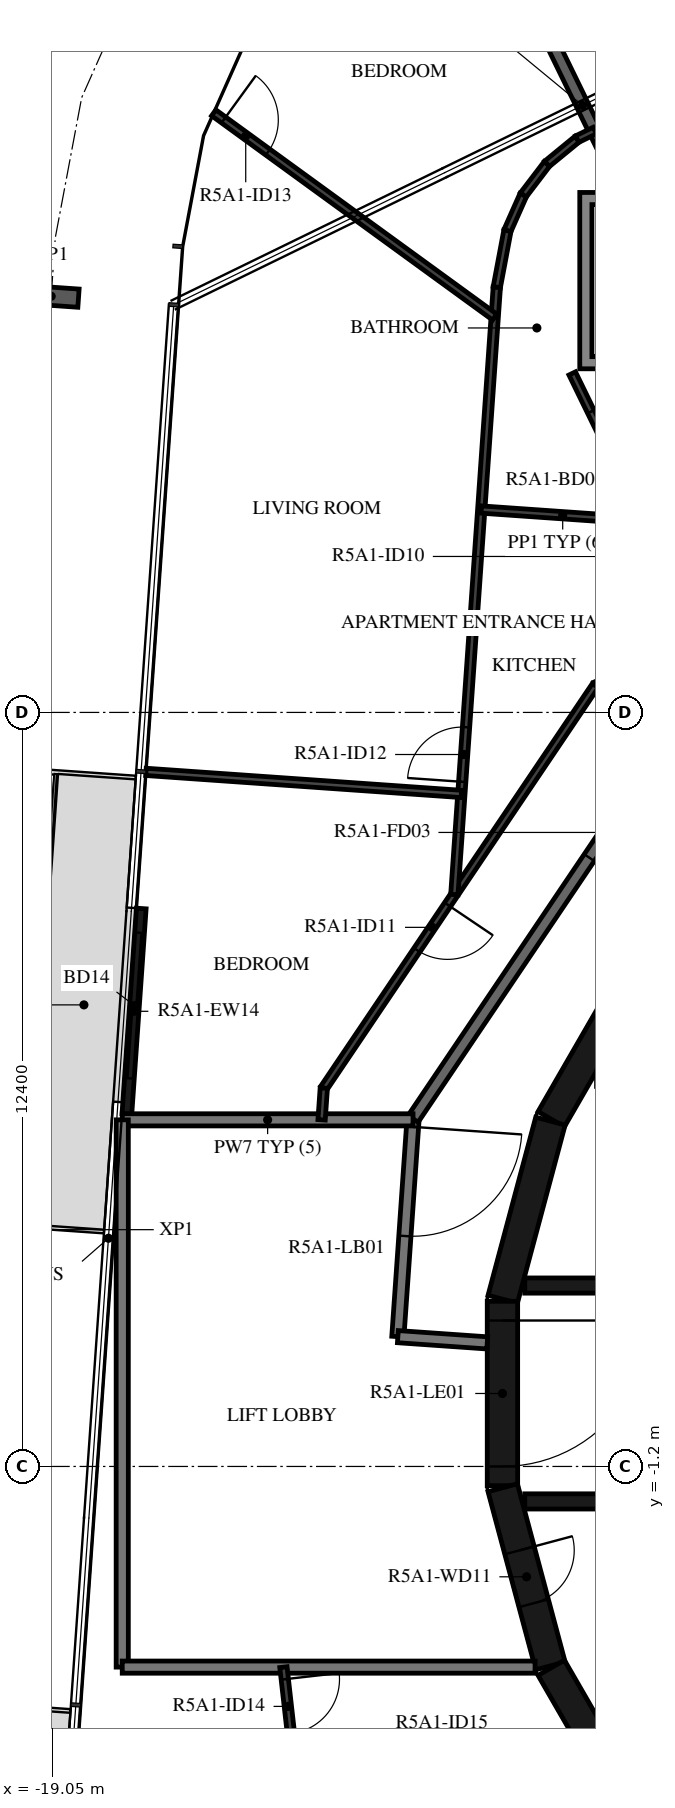
"""IFC4 building model, lengths in metres.
Left out: names, types, materials, properties, quantities, classifications, styles, units other than length and angle.
Written with IfcOpenShell. Run it as: python <this file> out.ifc"""

import sys

from ifc_helpers import new_model, si_unit, direction, frame, frame_2d, origin, origin_2d, place, context, subcontext, project, spatial, polyline, rectangle, i_section, outline, extrude, element, fill, save


model = new_model("IFC4")
c1 = context("Model", 3, precision=1e-05, world=origin(), true_north=direction((0.0, 1.0)))
c2 = subcontext(c1, "Body", "Model", "MODEL_VIEW")
j1 = project(units=[si_unit("LENGTHUNIT", "METRE"), si_unit("PLANEANGLEUNIT", "RADIAN")], contexts=[c1])
p1 = place(None, origin())
s1 = spatial("IfcSite", under=j1, at=p1, CompositionType="ELEMENT")
p2 = place(p1, origin())
s2 = spatial("IfcBuilding", under=s1, at=p2, CompositionType="ELEMENT")
p3 = place(p2, frame((0.0, 0.0, 191.9)))
s3 = spatial("IfcBuildingStorey", under=s2, at=p3, CompositionType="ELEMENT", Elevation=191.9)
p4 = place(p3, frame((-19.069, 18.044, -0.38), z_axis=(0.0, 0.0, 1.0), x_axis=(0.069756005795, 0.997564082982, 0.0)))
e1 = element("IfcColumn", 1, at=p4, inside=s3, PredefinedType="COLUMN", context=c2, shape_type="SweptSolid", body=[
    extrude(i_section(OverallWidth=0.3, OverallDepth=0.9, WebThickness=0.019, FlangeThickness=0.035, FilletRadius=0.03, at=origin_2d()), origin(), (0.0, 0.0, 1.0), 3.5),
])
p5 = place(p3, frame((-17.587, 7.975, 0.0), z_axis=(0.0, 0.0, 1.0), x_axis=(-0.069813354682, -0.997560071128, 0.0)))
e2 = element("IfcWall", 2, at=p5, inside=s3, PredefinedType="STANDARD", context=c2, shape_type="SweptSolid", body=[
    extrude(rectangle(XDim=3.389, YDim=0.16, at=frame_2d((1.694, 0.0))), origin(), (0.0, 0.0, 1.0), 3.12),
])
p6 = place(p5, frame((0.4, 0.0, 0.0)))
e3 = element("IfcOpeningElement", 3, at=p6, cuts=e2, PredefinedType="OPENING", context=c2, shape_type="SweptSolid", body=[
    extrude(rectangle(XDim=2.4, YDim=2.4, at=frame_2d((1.2, 1.2))), frame((0.0, 0.09, 0.0), z_axis=(0.0, -1.0, 0.0), x_axis=(1.0, 0.0, 0.0)), (0.0, 0.0, 1.0), 0.18),
])
for number, where, z_axis, x_axis in (
    (4, (-9.329, 7.137, 0.0), (0.0, 0.0, 1.0), (-0.5, -0.866, 0.0)),
    (5, (-10.858, 4.479, 0.0), (0.0, 0.0, 1.0), (-0.259, -0.966, 0.0)),
):
    element("IfcWall", number, at=place(p3, frame(where, z_axis=z_axis, x_axis=x_axis)), inside=s3, PredefinedType="SHEAR", context=c2, shape_type="SweptSolid", body=[
        extrude(rectangle(XDim=3.033, YDim=0.5, at=frame_2d((1.516, 0.0))), origin(), (0.0, 0.0, 1.0), 3.12),
    ])
p7 = place(p3, frame((-11.647, 1.516, 0.0), z_axis=(0.0, 0.0, 1.0), x_axis=(0.0, -1.0, 0.0)))
e6 = element("IfcWall", 6, at=p7, inside=s3, PredefinedType="SHEAR", context=c2, shape_type="SweptSolid", body=[
    extrude(rectangle(XDim=3.033, YDim=0.5, at=frame_2d((1.516, 0.0))), origin(), (0.0, 0.0, 1.0), 3.12),
])
p8 = place(p7, frame((0.316, 0.0, 0.0)))
e7 = element("IfcOpeningElement", 7, at=p8, cuts=e6, PredefinedType="OPENING", context=c2, shape_type="SweptSolid", body=[
    extrude(rectangle(XDim=2.4, YDim=2.1, at=frame_2d((1.2, 1.05))), frame((0.0, 0.26, 0.0), z_axis=(0.0, -1.0, 0.0), x_axis=(1.0, 0.0, 0.0)), (0.0, 0.0, 1.0), 0.52),
])
p9 = place(p3, frame((-11.643, -1.55, 0.0), z_axis=(0.0, 0.0, 1.0), x_axis=(0.258734743916, -0.965948410781, 0.0)))
e8 = element("IfcWall", 8, at=p9, inside=s3, PredefinedType="SHEAR", context=c2, shape_type="SweptSolid", body=[
    extrude(rectangle(XDim=3.033, YDim=0.5, at=frame_2d((1.516, 0.0))), origin(), (0.0, 0.0, 1.0), 3.12),
])
p10 = place(p9, frame((1.066, 0.0, 0.0)))
e9 = element("IfcOpeningElement", 9, at=p10, cuts=e8, PredefinedType="OPENING", context=c2, shape_type="SweptSolid", body=[
    extrude(rectangle(XDim=0.9, YDim=2.1, at=frame_2d((0.45, 1.05))), frame((0.0, 0.26, 0.0), z_axis=(0.0, -1.0, 0.0), x_axis=(1.0, 0.0, 0.0)), (0.0, 0.0, 1.0), 0.52),
])
p11 = place(p3, frame((-10.845, -4.51, 0.0), z_axis=(0.0, 0.0, 1.0), x_axis=(0.500087131594, -0.865975092491, 0.0)))
e10 = element("IfcWall", 10, at=p11, inside=s3, PredefinedType="SHEAR", context=c2, shape_type="SweptSolid", body=[
    extrude(rectangle(XDim=3.033, YDim=0.5, at=frame_2d((1.516, 0.0))), origin(), (0.0, 0.0, 1.0), 3.12),
])
p12 = place(p3, frame((-11.28, 1.775, 0.0), z_axis=(0.0, 0.0, 1.0), x_axis=(1.0, 0.0, 0.0)))
e11 = element("IfcWall", 11, at=p12, inside=s3, PredefinedType="SHEAR", context=c2, shape_type="SweptSolid", body=[
    extrude(rectangle(XDim=14.38, YDim=0.25, at=frame_2d((7.19, 0.0))), origin(), (0.0, 0.0, 1.0), 3.12),
])
p13 = place(p12, frame((10.73, 0.0, 0.0)))
e12 = element("IfcOpeningElement", 12, at=p13, cuts=e11, PredefinedType="OPENING", context=c2, shape_type="SweptSolid", body=[
    extrude(rectangle(XDim=1.1, YDim=2.1, at=frame_2d((0.55, 1.05))), frame((0.0, 0.135, 0.0), z_axis=(0.0, -1.0, 0.0), x_axis=(1.0, 0.0, 0.0)), (0.0, 0.0, 1.0), 0.27),
])
p14 = place(p12, frame((12.88, 0.0, 0.0)))
e13 = element("IfcOpeningElement", 13, at=p14, cuts=e11, PredefinedType="OPENING", context=c2, shape_type="SweptSolid", body=[
    extrude(rectangle(XDim=1.1, YDim=2.1, at=frame_2d((0.55, 1.05))), frame((0.0, 0.135, 0.0), z_axis=(0.0, -1.0, 0.0), x_axis=(1.0, 0.0, 0.0)), (0.0, 0.0, 1.0), 0.27),
])
p15 = place(p12, frame((3.305, 0.0, 0.0)))
e14 = element("IfcOpeningElement", 14, at=p15, cuts=e11, PredefinedType="OPENING", context=c2, shape_type="SweptSolid", body=[
    extrude(rectangle(XDim=0.9, YDim=2.1, at=frame_2d((0.45, 1.05))), frame((0.0, 0.135, 0.0), z_axis=(0.0, -1.0, 0.0), x_axis=(1.0, 0.0, 0.0)), (0.0, 0.0, 1.0), 0.27),
])
p16 = place(p12, frame((7.605, 0.0, 0.0)))
e15 = element("IfcOpeningElement", 15, at=p16, cuts=e11, PredefinedType="OPENING", context=c2, shape_type="SweptSolid", body=[
    extrude(rectangle(XDim=0.9, YDim=2.1, at=frame_2d((0.45, 1.05))), frame((0.0, 0.135, 0.0), z_axis=(0.0, -1.0, 0.0), x_axis=(1.0, 0.0, 0.0)), (0.0, 0.0, 1.0), 0.27),
])
p17 = place(p3, frame((-11.28, -1.775, 0.0), z_axis=(0.0, 0.0, 1.0), x_axis=(1.0, 0.0, 0.0)))
e16 = element("IfcWall", 16, at=p17, inside=s3, PredefinedType="SHEAR", context=c2, shape_type="SweptSolid", body=[
    extrude(rectangle(XDim=14.38, YDim=0.25, at=frame_2d((7.19, 0.0))), origin(), (0.0, 0.0, 1.0), 3.12),
])
p18 = place(p17, frame((12.88, 0.0, 0.0)))
e17 = element("IfcOpeningElement", 17, at=p18, cuts=e16, PredefinedType="OPENING", context=c2, shape_type="SweptSolid", body=[
    extrude(rectangle(XDim=1.1, YDim=2.1, at=frame_2d((0.55, 1.05))), frame((0.0, 0.135, 0.0), z_axis=(0.0, -1.0, 0.0), x_axis=(1.0, 0.0, 0.0)), (0.0, 0.0, 1.0), 0.27),
])
p19 = place(p17, frame((6.53, 0.0, 0.0)))
e18 = element("IfcOpeningElement", 18, at=p19, cuts=e16, PredefinedType="OPENING", context=c2, shape_type="SweptSolid", body=[
    extrude(rectangle(XDim=0.9, YDim=2.1, at=frame_2d((0.45, 1.05))), frame((0.0, 0.135, 0.0), z_axis=(0.0, -1.0, 0.0), x_axis=(1.0, 0.0, 0.0)), (0.0, 0.0, 1.0), 0.27),
])
p20 = place(p17, frame((8.68, 0.0, 0.0)))
e19 = element("IfcOpeningElement", 19, at=p20, cuts=e16, PredefinedType="OPENING", context=c2, shape_type="SweptSolid", body=[
    extrude(rectangle(XDim=0.9, YDim=2.1, at=frame_2d((0.45, 1.05))), frame((0.0, 0.135, 0.0), z_axis=(0.0, -1.0, 0.0), x_axis=(1.0, 0.0, 0.0)), (0.0, 0.0, 1.0), 0.27),
])
p21 = place(p17, frame((10.83, 0.0, 0.0)))
e20 = element("IfcOpeningElement", 20, at=p21, cuts=e16, PredefinedType="OPENING", context=c2, shape_type="SweptSolid", body=[
    extrude(rectangle(XDim=0.9, YDim=2.1, at=frame_2d((0.45, 1.05))), frame((0.0, 0.135, 0.0), z_axis=(0.0, -1.0, 0.0), x_axis=(1.0, 0.0, 0.0)), (0.0, 0.0, 1.0), 0.27),
])
p22 = place(p3, frame((-13.118, 4.5, 0.0), z_axis=(0.0, 0.0, 1.0), x_axis=(-0.069746872611, -0.99756472159, 0.0)))
e21 = element("IfcWall", 21, at=p22, inside=s3, PredefinedType="STANDARD", context=c2, shape_type="SweptSolid", body=[
    extrude(rectangle(XDim=3.574, YDim=0.2, at=frame_2d((1.787, 0.0))), origin(), (0.0, 0.0, 1.0), 3.12),
])
p23 = place(p22, frame((0.115, 0.0, 0.0)))
e22 = element("IfcOpeningElement", 22, at=p23, cuts=e21, PredefinedType="OPENING", context=c2, shape_type="SweptSolid", body=[
    extrude(rectangle(XDim=1.8, YDim=2.1, at=frame_2d((0.9, 1.05))), frame((0.0, 0.11, 0.0), z_axis=(0.0, -1.0, 0.0), x_axis=(1.0, 0.0, 0.0)), (0.0, 0.0, 1.0), 0.22),
])
p24 = place(p3, frame((-13.367, 0.935, 0.0), z_axis=(0.0, 0.0, 1.0), x_axis=(0.997553656289, -0.069904955655, 0.0)))
e23 = element("IfcWall", 23, at=p24, inside=s3, PredefinedType="STANDARD", context=c2, shape_type="SweptSolid", body=[
    extrude(rectangle(XDim=1.474, YDim=0.2, at=frame_2d((0.737, 0.0))), origin(), (0.0, 0.0, 1.0), 3.12),
])
p25 = place(p3, frame((-9.101, 10.47, 0.0), z_axis=(0.0, 0.0, 1.0), x_axis=(-0.559195469534, -0.829035841718, 0.0)))
e24 = element("IfcWall", 24, at=p25, inside=s3, PredefinedType="STANDARD", context=c2, shape_type="SweptSolid", body=[
    extrude(rectangle(XDim=7.181, YDim=0.2, at=frame_2d((3.591, 0.0))), origin(), (0.0, 0.0, 1.0), 3.12),
])
p26 = place(p25, frame((1.0, 0.0, 0.0)))
e25 = element("IfcOpeningElement", 25, at=p26, cuts=e24, PredefinedType="OPENING", context=c2, shape_type="SweptSolid", body=[
    extrude(rectangle(XDim=1.0, YDim=2.1, at=frame_2d((0.5, 1.05))), frame((0.0, 0.11, 0.0), z_axis=(0.0, -1.0, 0.0), x_axis=(1.0, 0.0, 0.0)), (0.0, 0.0, 1.0), 0.22),
])
p27 = place(p3, frame((-13.118, 4.5, 0.0), z_axis=(0.0, 0.0, 1.0), x_axis=(-1.0, 0.0, 0.0)))
e26 = element("IfcWall", 26, at=p27, inside=s3, PredefinedType="STANDARD", context=c2, shape_type="SweptSolid", body=[
    extrude(rectangle(XDim=4.782, YDim=0.2, at=frame_2d((2.391, 0.0))), origin(), (0.0, 0.0, 1.0), 3.12),
])
p28 = place(p3, frame((-17.9, 4.5, 0.0), z_axis=(0.0, 0.0, 1.0), x_axis=(0.0, -1.0, 0.0)))
e27 = element("IfcWall", 27, at=p28, inside=s3, PredefinedType="STANDARD", context=c2, shape_type="SweptSolid", body=[
    extrude(rectangle(XDim=9.0, YDim=0.2, at=frame_2d((4.5, 0.0))), origin(), (0.0, 0.0, 1.0), 3.12),
])
p29 = place(p3, frame((-17.9, -4.5, 0.0), z_axis=(0.0, 0.0, 1.0), x_axis=(1.0, 0.0, 0.0)))
e28 = element("IfcWall", 28, at=p29, inside=s3, PredefinedType="STANDARD", context=c2, shape_type="SweptSolid", body=[
    extrude(rectangle(XDim=6.789, YDim=0.2, at=frame_2d((3.394, 0.0))), origin(), (0.0, 0.0, 1.0), 3.12),
])
p30 = place(p3, frame((-12.409, 25.442, 0.0), z_axis=(0.0, 0.0, 1.0), x_axis=(0.43838641251, -0.898786600549, 0.0)))
e29 = element("IfcWall", 29, at=p30, inside=s3, PredefinedType="STANDARD", context=c2, shape_type="SweptSolid", body=[
    extrude(rectangle(XDim=6.333, YDim=0.2, at=frame_2d((3.166, 0.0))), origin(), (0.0, 0.0, 1.0), 3.12),
])
p31 = place(p3, frame((-10.5, 16.775, 0.0), z_axis=(0.0, 0.0, 1.0), x_axis=(0.438345136783, -0.898806731761, 0.0)))
e30 = element("IfcWall", 30, at=p31, inside=s3, PredefinedType="PARTITIONING", context=c2, shape_type="SweptSolid", body=[
    extrude(rectangle(XDim=4.78, YDim=0.12, at=frame_2d((2.39, 0.0))), origin(), (0.0, 0.0, 1.0), 3.12),
])
p32 = place(p31, frame((0.7, 0.0, 0.0)))
e31 = element("IfcOpeningElement", 31, at=p32, cuts=e30, PredefinedType="OPENING", context=c2, shape_type="SweptSolid", body=[
    extrude(rectangle(XDim=0.8, YDim=2.1, at=frame_2d((0.4, 1.05))), frame((0.0, 0.07, 0.0), z_axis=(0.0, -1.0, 0.0), x_axis=(1.0, 0.0, 0.0)), (0.0, 0.0, 1.0), 0.14),
])
p33 = place(p31, frame((2.899, 0.0, 0.0)))
e32 = element("IfcOpeningElement", 32, at=p33, cuts=e30, PredefinedType="OPENING", context=c2, shape_type="SweptSolid", body=[
    extrude(rectangle(XDim=0.9, YDim=2.1, at=frame_2d((0.45, 1.05))), frame((0.0, 0.07, 0.0), z_axis=(0.0, -1.0, 0.0), x_axis=(1.0, 0.0, 0.0)), (0.0, 0.0, 1.0), 0.14),
])
p34 = place(p3, frame((-8.405, 12.479, 0.0), z_axis=(0.0, 0.0, 1.0), x_axis=(-0.898784427692, -0.438390867307, 0.0)))
e33 = element("IfcWall", 33, at=p34, inside=s3, PredefinedType="PARTITIONING", context=c2, shape_type="SweptSolid", body=[
    extrude(rectangle(XDim=1.908, YDim=0.12, at=frame_2d((0.954, 0.0))), origin(), (0.0, 0.0, 1.0), 3.12),
])
p35 = place(p3, frame((-10.12, 11.642, 0.0), z_axis=(0.0, 0.0, 1.0), x_axis=(-0.55920080659, -0.829032241779, 0.0)))
e34 = element("IfcWall", 34, at=p35, inside=s3, PredefinedType="PARTITIONING", context=c2, shape_type="SweptSolid", body=[
    extrude(rectangle(XDim=7.985, YDim=0.12, at=frame_2d((3.992, 0.0))), origin(), (0.0, 0.0, 1.0), 3.12),
])
p36 = place(p35, frame((4.346, 0.0, 0.0)))
e35 = element("IfcOpeningElement", 35, at=p36, cuts=e34, PredefinedType="OPENING", context=c2, shape_type="SweptSolid", body=[
    extrude(rectangle(XDim=0.9, YDim=2.1, at=frame_2d((0.45, 1.05))), frame((0.0, 0.07, 0.0), z_axis=(0.0, -1.0, 0.0), x_axis=(1.0, 0.0, 0.0)), (0.0, 0.0, 1.0), 0.14),
])
p37 = place(p3, frame((-14.585, 5.022, 0.0), z_axis=(0.0, 0.0, 1.0), x_axis=(-0.069490327804, -0.997582625321, 0.0)))
e36 = element("IfcWall", 36, at=p37, inside=s3, PredefinedType="PARTITIONING", context=c2, shape_type="SweptSolid", body=[
    extrude(rectangle(XDim=0.523, YDim=0.12, at=frame_2d((0.262, 0.0))), origin(), (0.0, 0.0, 1.0), 3.12),
])
p38 = place(p3, frame((-12.439, 8.204, 0.0), z_axis=(0.0, 0.0, 1.0), x_axis=(0.069750037523, 0.997564500303, 0.0)))
e37 = element("IfcWall", 37, at=p38, inside=s3, PredefinedType="PARTITIONING", context=c2, shape_type="SweptSolid", body=[
    extrude(rectangle(XDim=10.014, YDim=0.12, at=frame_2d((5.007, 0.0))), origin(), (0.0, 0.0, 1.0), 3.12),
])
p39 = place(p38, frame((1.859, 0.0, 0.0)))
e38 = element("IfcOpeningElement", 38, at=p39, cuts=e37, PredefinedType="OPENING", context=c2, shape_type="SweptSolid", body=[
    extrude(rectangle(XDim=0.9, YDim=2.1, at=frame_2d((0.45, 1.05))), frame((0.0, 0.07, 0.0), z_axis=(0.0, -1.0, 0.0), x_axis=(1.0, 0.0, 0.0)), (0.0, 0.0, 1.0), 0.14),
])
p40 = place(p3, frame((-11.74, 18.194, 0.0), z_axis=(0.0, 0.0, 1.0), x_axis=(0.185144760846, 0.982711258474, 0.0)))
e39 = element("IfcWall", 39, at=p40, inside=s3, PredefinedType="PARTITIONING", context=c2, shape_type="SweptSolid", body=[
    extrude(rectangle(XDim=0.947, YDim=0.12, at=frame_2d((0.473, 0.0))), origin(), (0.0, 0.0, 1.0), 3.12),
])
for number, where, z_axis, x_axis in (
    (40, (-11.565, 19.125, 0.0), (0.0, 0.0, 1.0), (0.407, 0.914, 0.0)),
    (41, (-11.304, 19.711, 0.0), (0.0, 0.0, 1.0), (0.607, 0.795, 0.0)),
    (42, (-10.915, 20.221, 0.0), (0.0, 0.0, 1.0), (0.773, 0.634, 0.0)),
):
    element("IfcWall", number, at=place(p3, frame(where, z_axis=z_axis, x_axis=x_axis)), inside=s3, PredefinedType="PARTITIONING", context=c2, shape_type="SweptSolid", body=[
        extrude(rectangle(XDim=0.642, YDim=0.12, at=frame_2d((0.321, 0.0))), origin(), (0.0, 0.0, 1.0), 3.12),
    ])
p41 = place(p3, frame((-10.418, 20.628, 0.0), z_axis=(0.0, 0.0, 1.0), x_axis=(0.898943795765, 0.438063981692, 0.0)))
e43 = element("IfcWall", 43, at=p41, inside=s3, PredefinedType="PARTITIONING", context=c2, shape_type="SweptSolid", body=[
    extrude(rectangle(XDim=0.321, YDim=0.12, at=frame_2d((0.161, 0.0))), origin(), (0.0, 0.0, 1.0), 3.12),
])
p42 = place(p3, frame((-16.395, 21.061, 0.0), z_axis=(0.0, 0.0, 1.0), x_axis=(0.808810002497, -0.58807004673, 0.0)))
e44 = element("IfcWall", 44, at=p42, inside=s3, PredefinedType="PARTITIONING", context=c2, shape_type="SweptSolid", body=[
    extrude(rectangle(XDim=5.713, YDim=0.12, at=frame_2d((2.856, 0.0))), origin(), (0.0, 0.0, 1.0), 3.12),
])
p43 = place(p42, frame((0.2, 0.0, 0.0)))
e45 = element("IfcOpeningElement", 45, at=p43, cuts=e44, PredefinedType="OPENING", context=c2, shape_type="SweptSolid", body=[
    extrude(rectangle(XDim=0.9, YDim=2.1, at=frame_2d((0.45, 1.05))), frame((0.0, 0.07, 0.0), z_axis=(0.0, -1.0, 0.0), x_axis=(1.0, 0.0, 0.0)), (0.0, 0.0, 1.0), 0.14),
])
p44 = place(p3, frame((-11.996, 14.536, 0.0), z_axis=(0.0, 0.0, 1.0), x_axis=(0.997565991425, -0.069728708231, 0.0)))
e46 = element("IfcWall", 46, at=p44, inside=s3, PredefinedType="PARTITIONING", context=c2, shape_type="SweptSolid", body=[
    extrude(rectangle(XDim=2.686, YDim=0.12, at=frame_2d((1.343, 0.0))), origin(), (0.0, 0.0, 1.0), 3.12),
])
p45 = place(p3, frame((-17.51, 10.222, 0.0), z_axis=(0.0, 0.0, 1.0), x_axis=(0.997563184303, -0.069768856397, 0.0)))
e47 = element("IfcWall", 47, at=p45, inside=s3, PredefinedType="PARTITIONING", context=c2, shape_type="SweptSolid", body=[
    extrude(rectangle(XDim=5.2, YDim=0.12, at=frame_2d((2.6, 0.0))), origin(), (0.0, 0.0, 1.0), 2.73),
])
p46 = place(p3, frame((-15.25, -4.5, 0.0), z_axis=(0.0, 0.0, 1.0), x_axis=(0.1124919794, -0.99365263275, 0.0)))
e48 = element("IfcWall", 48, at=p46, inside=s3, PredefinedType="PARTITIONING", context=c2, shape_type="SweptSolid", body=[
    extrude(rectangle(XDim=1.534, YDim=0.12, at=frame_2d((0.767, 0.0))), origin(), (0.0, 0.0, 1.0), 3.12),
])
p47 = place(p46, frame((0.2, 0.0, 0.0)))
e49 = element("IfcOpeningElement", 49, at=p47, cuts=e48, PredefinedType="OPENING", context=c2, shape_type="SweptSolid", body=[
    extrude(rectangle(XDim=0.9, YDim=2.1, at=frame_2d((0.45, 1.05))), frame((0.0, 0.07, 0.0), z_axis=(0.0, -1.0, 0.0), x_axis=(1.0, 0.0, 0.0)), (0.0, 0.0, 1.0), 0.14),
])
p48 = place(p3, origin())
e50 = element("IfcWall", 50, at=p48, inside=s3, PredefinedType="STANDARD", context=c2, shape_type="SweptSolid", body=[
    extrude(outline(polyline([(-7.476, 19.751), (-7.476, 16.851), (-10.376, 16.851), (-10.376, 19.751), (-7.476, 19.751)]), holes=[polyline([(-10.176, 17.051), (-7.676, 17.051), (-7.676, 19.551), (-10.176, 19.551), (-10.176, 17.051)])]), origin(), (0.0, 0.0, 1.0), 3.12),
])
p49 = place(p6, origin())
e51 = element("IfcDoor", 51, at=p49, inside=s3, OperationType="DOUBLE_DOOR_SLIDING", PredefinedType="DOOR", context=c2, shape_type="SweptSolid", body=[
    extrude(rectangle(XDim=2.4, YDim=2.4, at=frame_2d((1.2, 1.2))), frame((0.0, 0.025, 0.0), z_axis=(0.0, -1.0, 0.0), x_axis=(1.0, 0.0, 0.0)), (0.0, 0.0, 1.0), 0.05),
])
fill(e3, e51)
p50 = place(p8, origin())
e52 = element("IfcDoor", 52, at=p50, inside=s3, OperationType="DOUBLE_DOOR_SINGLE_SWING", PredefinedType="DOOR", context=c2, shape_type="SweptSolid", body=[
    extrude(rectangle(XDim=2.4, YDim=2.1, at=frame_2d((1.2, 1.05))), frame((0.0, 0.025, 0.0), z_axis=(0.0, -1.0, 0.0), x_axis=(1.0, 0.0, 0.0)), (0.0, 0.0, 1.0), 0.05),
])
fill(e7, e52)
p51 = place(p10, origin())
e53 = element("IfcDoor", 53, at=p51, inside=s3, OperationType="SINGLE_SWING_LEFT", PredefinedType="DOOR", context=c2, shape_type="SweptSolid", body=[
    extrude(rectangle(XDim=0.9, YDim=2.1, at=frame_2d((0.45, 1.05))), frame((0.0, 0.025, 0.0), z_axis=(0.0, -1.0, 0.0), x_axis=(1.0, 0.0, 0.0)), (0.0, 0.0, 1.0), 0.05),
])
fill(e9, e53)
p52 = place(p26, origin())
e54 = element("IfcDoor", 54, at=p52, inside=s3, OperationType="SINGLE_SWING_LEFT", PredefinedType="DOOR", context=c2, shape_type="SweptSolid", body=[
    extrude(rectangle(XDim=1.0, YDim=2.1, at=frame_2d((0.5, 1.05))), frame((0.0, 0.025, 0.0), z_axis=(0.0, -1.0, 0.0), x_axis=(1.0, 0.0, 0.0)), (0.0, 0.0, 1.0), 0.05),
])
fill(e25, e54)
p53 = place(p32, origin())
e55 = element("IfcDoor", 55, at=p53, inside=s3, OperationType="SINGLE_SWING_LEFT", PredefinedType="DOOR", context=c2, shape_type="SweptSolid", body=[
    extrude(rectangle(XDim=0.8, YDim=2.1, at=frame_2d((0.4, 1.05))), frame((0.0, 0.025, 0.0), z_axis=(0.0, -1.0, 0.0), x_axis=(1.0, 0.0, 0.0)), (0.0, 0.0, 1.0), 0.05),
])
fill(e31, e55)
p54 = place(p36, origin())
e56 = element("IfcDoor", 56, at=p54, inside=s3, OperationType="SINGLE_SWING_LEFT", PredefinedType="DOOR", context=c2, shape_type="SweptSolid", body=[
    extrude(rectangle(XDim=0.9, YDim=2.1, at=frame_2d((0.45, 1.05))), frame((0.0, 0.025, 0.0), z_axis=(0.0, -1.0, 0.0), x_axis=(1.0, 0.0, 0.0)), (0.0, 0.0, 1.0), 0.05),
])
fill(e35, e56)
p55 = place(p39, origin())
e57 = element("IfcDoor", 57, at=p55, inside=s3, OperationType="SINGLE_SWING_LEFT", PredefinedType="DOOR", context=c2, shape_type="SweptSolid", body=[
    extrude(rectangle(XDim=0.9, YDim=2.1, at=frame_2d((0.45, 1.05))), frame((0.0, 0.025, 0.0), z_axis=(0.0, -1.0, 0.0), x_axis=(1.0, 0.0, 0.0)), (0.0, 0.0, 1.0), 0.05),
])
fill(e38, e57)
p56 = place(p43, origin())
e58 = element("IfcDoor", 58, at=p56, inside=s3, OperationType="SINGLE_SWING_LEFT", PredefinedType="DOOR", context=c2, shape_type="SweptSolid", body=[
    extrude(rectangle(XDim=0.9, YDim=2.1, at=frame_2d((0.45, 1.05))), frame((0.0, 0.025, 0.0), z_axis=(0.0, -1.0, 0.0), x_axis=(1.0, 0.0, 0.0)), (0.0, 0.0, 1.0), 0.05),
])
fill(e45, e58)
p57 = place(p47, origin())
e59 = element("IfcDoor", 59, at=p57, inside=s3, OperationType="SINGLE_SWING_RIGHT", PredefinedType="DOOR", context=c2, shape_type="SweptSolid", body=[
    extrude(rectangle(XDim=0.9, YDim=2.1, at=frame_2d((0.45, 1.05))), frame((0.0, 0.025, 0.0), z_axis=(0.0, -1.0, 0.0), x_axis=(1.0, 0.0, 0.0)), (0.0, 0.0, 1.0), 0.05),
])
fill(e49, e59)
p58 = place(p23, origin())
e60 = element("IfcDoor", 60, at=p58, inside=s3, OperationType="DOUBLE_DOOR_SINGLE_SWING", PredefinedType="DOOR", context=c2, shape_type="SweptSolid", body=[
    extrude(rectangle(XDim=1.8, YDim=2.1, at=frame_2d((0.9, 1.05))), frame((0.0, 0.025, 0.0), z_axis=(0.0, -1.0, 0.0), x_axis=(1.0, 0.0, 0.0)), (0.0, 0.0, 1.0), 0.05),
])
fill(e22, e60)
save(model, sys.argv[1])
